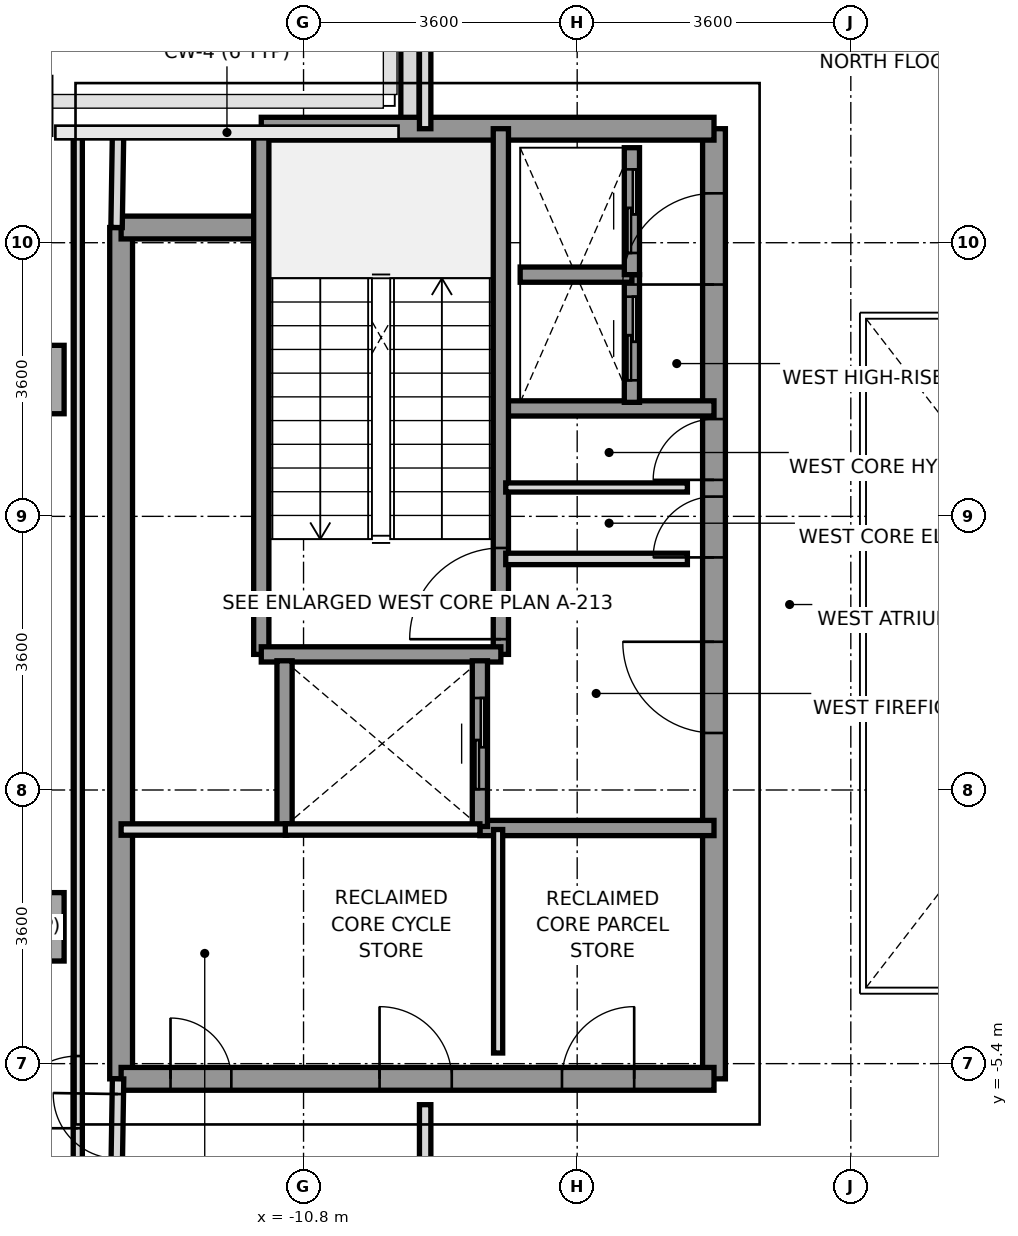
"""IFC4 building model, lengths in metres.
Left out: names, types, materials, properties, quantities, classifications, styles, units other than length and angle.
Written with IfcOpenShell. Run it as: python <this file> out.ifc"""

import sys

from ifc_helpers import new_model, si_unit, direction, frame, frame_2d, origin, origin_2d, place, context, subcontext, project, spatial, rectangle, extrude, source, transform, mapped, element, fill, save


model = new_model("IFC4")
c1 = context("Model", 3, precision=1e-05, world=origin(), true_north=direction((0.0, 1.0)))
c2 = subcontext(c1, "Body", "Model", "MODEL_VIEW")
j1 = project(units=[si_unit("LENGTHUNIT", "METRE"), si_unit("PLANEANGLEUNIT", "RADIAN")], contexts=[c1])
p1 = place(None, origin())
s1 = spatial("IfcSite", under=j1, at=p1, CompositionType="ELEMENT")
p2 = place(p1, origin())
s2 = spatial("IfcBuilding", under=s1, at=p2, CompositionType="ELEMENT")
p3 = place(p2, frame((0.0, 0.0, 219.4)))
s3 = spatial("IfcBuildingStorey", under=s2, at=p3, CompositionType="ELEMENT", Elevation=219.4)
m1 = source(origin(), c2, "Body", "SweptSolid", [
    extrude(rectangle(XDim=0.9, YDim=0.9, at=origin_2d()), origin(), (0.0, 0.0, 1.0), 4.01),
])
for number, where, z_axis, x_axis in (
    (1, (-14.4, -3.6, 0.0), (0.0, 0.0, 1.0), (1.0, 0.0, 0.0)),
    (2, (-14.4, 3.6, 0.0), (0.0, 0.0, 1.0), (1.0, 0.0, 0.0)),
):
    element("IfcColumn", number, at=place(p3, frame(where, z_axis=z_axis, x_axis=x_axis)), inside=s3, PredefinedType="COLUMN", context=c2, shape_type="MappedRepresentation", body=[
        mapped(m1, transform((0.0, 0.0, 0.0), x_axis=(1.0, 0.0, 0.0), y_axis=(0.0, 1.0, 0.0), z_axis=(0.0, 0.0, 1.0), scale=1.0)),
    ])
p4 = place(p3, frame((-9.4, 6.953, 0.0), z_axis=(0.0, 0.0, 1.0), x_axis=(0.0, 1.0, 0.0)))
e3 = element("IfcWall", 3, at=p4, inside=s3, PredefinedType="PARAPET", context=c2, shape_type="SweptSolid", body=[
    extrude(rectangle(XDim=1.669, YDim=0.24, at=frame_2d((0.834, 0.0))), origin(), (0.0, 0.0, 1.0), 1.15),
])
p5 = place(p3, frame((-13.2, -5.6, 0.0), z_axis=(0.0, 0.0, 1.0), x_axis=(0.0, 1.0, 0.0)))
e4 = element("IfcWall", 4, at=p5, inside=s3, PredefinedType="SHEAR", context=c2, shape_type="SweptSolid", body=[
    extrude(rectangle(XDim=11.2, YDim=0.3, at=frame_2d((5.6, 0.0))), origin(), (0.0, 0.0, 1.0), 4.01),
])
p6 = place(p3, frame((-5.4, -5.6, 0.0), z_axis=(0.0, 0.0, 1.0), x_axis=(0.0, 1.0, 0.0)))
e5 = element("IfcWall", 5, at=p6, inside=s3, PredefinedType="SHEAR", context=c2, shape_type="SweptSolid", body=[
    extrude(rectangle(XDim=12.5, YDim=0.3, at=frame_2d((6.25, 0.0))), origin(), (0.0, 0.0, 1.0), 4.01),
])
p7 = place(p6, frame((4.55, 0.0, 0.0)))
e6 = element("IfcOpeningElement", 6, at=p7, cuts=e5, PredefinedType="OPENING", context=c2, shape_type="SweptSolid", body=[
    extrude(rectangle(XDim=1.2, YDim=2.2, at=frame_2d((0.6, 1.1))), frame((0.0, 0.16, 0.0), z_axis=(0.0, -1.0, 0.0), x_axis=(1.0, 0.0, 0.0)), (0.0, 0.0, 1.0), 0.32),
])
p8 = place(p6, frame((10.45, 0.0, 0.0)))
e7 = element("IfcOpeningElement", 7, at=p8, cuts=e5, PredefinedType="OPENING", context=c2, shape_type="SweptSolid", body=[
    extrude(rectangle(XDim=1.2, YDim=2.2, at=frame_2d((0.6, 1.1))), frame((0.0, 0.16, 0.0), z_axis=(0.0, -1.0, 0.0), x_axis=(1.0, 0.0, 0.0)), (0.0, 0.0, 1.0), 0.32),
])
p9 = place(p6, frame((6.86, 0.0, 0.0)))
e8 = element("IfcOpeningElement", 8, at=p9, cuts=e5, PredefinedType="OPENING", context=c2, shape_type="SweptSolid", body=[
    extrude(rectangle(XDim=0.8, YDim=2.1, at=frame_2d((0.4, 1.05))), frame((0.0, 0.16, 0.0), z_axis=(0.0, -1.0, 0.0), x_axis=(1.0, 0.0, 0.0)), (0.0, 0.0, 1.0), 0.32),
])
p10 = place(p6, frame((7.88, 0.0, 0.0)))
e9 = element("IfcOpeningElement", 9, at=p10, cuts=e5, PredefinedType="OPENING", context=c2, shape_type="SweptSolid", body=[
    extrude(rectangle(XDim=0.8, YDim=2.1, at=frame_2d((0.4, 1.05))), frame((0.0, 0.16, 0.0), z_axis=(0.0, -1.0, 0.0), x_axis=(1.0, 0.0, 0.0)), (0.0, 0.0, 1.0), 0.32),
])
p11 = place(p3, frame((-11.356, 6.9, 0.0), z_axis=(0.0, 0.0, 1.0), x_axis=(1.0, 0.0, 0.0)))
e10 = element("IfcWall", 10, at=p11, inside=s3, PredefinedType="SHEAR", context=c2, shape_type="SweptSolid", body=[
    extrude(rectangle(XDim=5.956, YDim=0.3, at=frame_2d((2.978, 0.0))), origin(), (0.0, 0.0, 1.0), 4.01),
])
p12 = place(p3, frame((-13.2, 5.6, 0.0), z_axis=(0.0, 0.0, 1.0), x_axis=(1.0, 0.0, 0.0)))
e11 = element("IfcWall", 11, at=p12, inside=s3, PredefinedType="SHEAR", context=c2, shape_type="SweptSolid", body=[
    extrude(rectangle(XDim=1.844, YDim=0.3, at=frame_2d((0.922, 0.0))), origin(), (0.0, 0.0, 1.0), 4.01),
])
p13 = place(p3, frame((-13.2, -5.6, 0.0), z_axis=(0.0, 0.0, 1.0), x_axis=(1.0, 0.0, 0.0)))
e12 = element("IfcWall", 12, at=p13, inside=s3, PredefinedType="SHEAR", context=c2, shape_type="SweptSolid", body=[
    extrude(rectangle(XDim=7.8, YDim=0.3, at=frame_2d((3.9, 0.0))), origin(), (0.0, 0.0, 1.0), 4.01),
])
p14 = place(p13, frame((0.65, 0.0, 0.0)))
e13 = element("IfcOpeningElement", 13, at=p14, cuts=e12, PredefinedType="OPENING", context=c2, shape_type="SweptSolid", body=[
    extrude(rectangle(XDim=0.8, YDim=2.1, at=frame_2d((0.4, 1.05))), frame((0.0, 0.16, 0.0), z_axis=(0.0, -1.0, 0.0), x_axis=(1.0, 0.0, 0.0)), (0.0, 0.0, 1.0), 0.32),
])
p15 = place(p13, frame((3.4, 0.0, 0.0)))
e14 = element("IfcOpeningElement", 14, at=p15, cuts=e12, PredefinedType="OPENING", context=c2, shape_type="SweptSolid", body=[
    extrude(rectangle(XDim=0.95, YDim=2.15, at=frame_2d((0.475, 1.075))), frame((0.0, 0.16, 0.0), z_axis=(0.0, -1.0, 0.0), x_axis=(1.0, 0.0, 0.0)), (0.0, 0.0, 1.0), 0.32),
])
p16 = place(p13, frame((5.8, 0.0, 0.0)))
e15 = element("IfcOpeningElement", 15, at=p16, cuts=e12, PredefinedType="OPENING", context=c2, shape_type="SweptSolid", body=[
    extrude(rectangle(XDim=0.95, YDim=2.15, at=frame_2d((0.475, 1.075))), frame((0.0, 0.16, 0.0), z_axis=(0.0, -1.0, 0.0), x_axis=(1.0, 0.0, 0.0)), (0.0, 0.0, 1.0), 0.32),
])
p17 = place(p3, frame((-8.18, 3.22, 0.0), z_axis=(0.0, 0.0, 1.0), x_axis=(1.0, 0.0, 0.0)))
e16 = element("IfcWall", 16, at=p17, inside=s3, PredefinedType="SOLIDWALL", context=c2, shape_type="SweptSolid", body=[
    extrude(rectangle(XDim=2.78, YDim=0.2, at=frame_2d((1.39, 0.0))), origin(), (0.0, 0.0, 1.0), 4.01),
])
p18 = place(p3, frame((-8.48, -2.3, 0.0), z_axis=(0.0, 0.0, 1.0), x_axis=(1.0, 0.0, 0.0)))
e17 = element("IfcWall", 17, at=p18, inside=s3, PredefinedType="SOLIDWALL", context=c2, shape_type="SweptSolid", body=[
    extrude(rectangle(XDim=3.08, YDim=0.2, at=frame_2d((1.54, 0.0))), origin(), (0.0, 0.0, 1.0), 4.01),
])
p19 = place(p3, frame((-8.204, -0.016, 0.0), z_axis=(0.0, 0.0, 1.0), x_axis=(0.0, 1.0, 0.0)))
e18 = element("IfcWall", 18, at=p19, inside=s3, PredefinedType="SOLIDWALL", context=c2, shape_type="SweptSolid", body=[
    extrude(rectangle(XDim=6.916, YDim=0.2, at=frame_2d((3.458, 0.0))), origin(), (0.0, 0.0, 1.0), 4.01),
])
p20 = place(p19, frame((0.2, 0.0, 0.0)))
e19 = element("IfcOpeningElement", 19, at=p20, cuts=e18, PredefinedType="OPENING", context=c2, shape_type="SweptSolid", body=[
    extrude(rectangle(XDim=1.2, YDim=2.2, at=frame_2d((0.6, 1.1))), frame((0.0, 0.11, 0.0), z_axis=(0.0, -1.0, 0.0), x_axis=(1.0, 0.0, 0.0)), (0.0, 0.0, 1.0), 0.22),
])
p21 = place(p3, frame((-11.356, -0.016, 0.0), z_axis=(0.0, 0.0, 1.0), x_axis=(0.0, 1.0, 0.0)))
e20 = element("IfcWall", 20, at=p21, inside=s3, PredefinedType="SOLIDWALL", context=c2, shape_type="SweptSolid", body=[
    extrude(rectangle(XDim=6.916, YDim=0.2, at=frame_2d((3.458, 0.0))), origin(), (0.0, 0.0, 1.0), 4.01),
])
p22 = place(p3, frame((-11.356, -0.016, 0.0), z_axis=(0.0, 0.0, 1.0), x_axis=(1.0, 0.0, 0.0)))
e21 = element("IfcWall", 21, at=p22, inside=s3, PredefinedType="SOLIDWALL", context=c2, shape_type="SweptSolid", body=[
    extrude(rectangle(XDim=3.152, YDim=0.2, at=frame_2d((1.576, 0.0))), origin(), (0.0, 0.0, 1.0), 4.01),
])
p23 = place(p3, frame((-11.05, -2.28, 0.0), z_axis=(0.0, 0.0, 1.0), x_axis=(0.0, 1.0, 0.0)))
e22 = element("IfcWall", 22, at=p23, inside=s3, PredefinedType="SOLIDWALL", context=c2, shape_type="SweptSolid", body=[
    extrude(rectangle(XDim=2.18, YDim=0.2, at=frame_2d((1.09, 0.0))), origin(), (0.0, 0.0, 1.0), 4.01),
])
p24 = place(p3, frame((-8.48, -2.28, 0.0), z_axis=(0.0, 0.0, 1.0), x_axis=(0.0, 1.0, 0.0)))
e23 = element("IfcWall", 23, at=p24, inside=s3, PredefinedType="SOLIDWALL", context=c2, shape_type="SweptSolid", body=[
    extrude(rectangle(XDim=2.18, YDim=0.2, at=frame_2d((1.09, 0.0))), origin(), (0.0, 0.0, 1.0), 4.01),
])
p25 = place(p24, frame((0.49, 0.0, 0.0)))
e24 = element("IfcOpeningElement", 24, at=p25, cuts=e23, PredefinedType="OPENING", context=c2, shape_type="SweptSolid", body=[
    extrude(rectangle(XDim=1.2, YDim=2.2, at=frame_2d((0.6, 1.1))), frame((0.0, 0.11, 0.0), z_axis=(0.0, -1.0, 0.0), x_axis=(1.0, 0.0, 0.0)), (0.0, 0.0, 1.0), 0.22),
])
p26 = place(p3, frame((-6.48, 3.3, 0.0), z_axis=(0.0, 0.0, 1.0), x_axis=(0.0, 1.0, 0.0)))
e25 = element("IfcWall", 25, at=p26, inside=s3, PredefinedType="SOLIDWALL", context=c2, shape_type="SweptSolid", body=[
    extrude(rectangle(XDim=1.68, YDim=0.2, at=frame_2d((0.84, 0.0))), origin(), (0.0, 0.0, 1.0), 4.01),
])
p27 = place(p26, frame((0.29, 0.0, 0.0)))
e26 = element("IfcOpeningElement", 26, at=p27, cuts=e25, PredefinedType="OPENING", context=c2, shape_type="SweptSolid", body=[
    extrude(rectangle(XDim=1.1, YDim=2.2, at=frame_2d((0.55, 1.1))), frame((0.0, 0.11, 0.0), z_axis=(0.0, -1.0, 0.0), x_axis=(1.0, 0.0, 0.0)), (0.0, 0.0, 1.0), 0.22),
])
p28 = place(p3, frame((-7.95, 4.98, 0.0), z_axis=(0.0, 0.0, 1.0), x_axis=(1.0, 0.0, 0.0)))
e27 = element("IfcWall", 27, at=p28, inside=s3, PredefinedType="SOLIDWALL", context=c2, shape_type="SweptSolid", body=[
    extrude(rectangle(XDim=1.47, YDim=0.2, at=frame_2d((0.735, 0.0))), origin(), (0.0, 0.0, 1.0), 4.01),
])
p29 = place(p3, frame((-6.48, 4.98, 0.0), z_axis=(0.0, 0.0, 1.0), x_axis=(0.0, 1.0, 0.0)))
e28 = element("IfcWall", 28, at=p29, inside=s3, PredefinedType="SOLIDWALL", context=c2, shape_type="SweptSolid", body=[
    extrude(rectangle(XDim=1.67, YDim=0.2, at=frame_2d((0.835, 0.0))), origin(), (0.0, 0.0, 1.0), 4.01),
])
p30 = place(p29, frame((0.285, 0.0, 0.0)))
e29 = element("IfcOpeningElement", 29, at=p30, cuts=e28, PredefinedType="OPENING", context=c2, shape_type="SweptSolid", body=[
    extrude(rectangle(XDim=1.1, YDim=2.2, at=frame_2d((0.55, 1.1))), frame((0.0, 0.11, 0.0), z_axis=(0.0, -1.0, 0.0), x_axis=(1.0, 0.0, 0.0)), (0.0, 0.0, 1.0), 0.22),
])
p31 = place(p3, frame((-8.14, 1.24, 0.0), z_axis=(0.0, 0.0, 1.0), x_axis=(1.0, 0.0, 0.0)))
e30 = element("IfcWall", 30, at=p31, inside=s3, PredefinedType="PARTITIONING", context=c2, shape_type="SweptSolid", body=[
    extrude(rectangle(XDim=2.39, YDim=0.15, at=frame_2d((1.195, 0.0))), origin(), (0.0, 0.0, 1.0), 3.11),
])
p32 = place(p3, frame((-8.14, 2.18, 0.0), z_axis=(0.0, 0.0, 1.0), x_axis=(1.0, 0.0, 0.0)))
e31 = element("IfcWall", 31, at=p32, inside=s3, PredefinedType="PARTITIONING", context=c2, shape_type="SweptSolid", body=[
    extrude(rectangle(XDim=2.39, YDim=0.12, at=frame_2d((1.195, 0.0))), origin(), (0.0, 0.0, 1.0), 3.11),
])
p33 = place(p3, frame((-13.2, -2.32, 0.0), z_axis=(0.0, 0.0, 1.0), x_axis=(1.0, 0.0, 0.0)))
e32 = element("IfcWall", 32, at=p33, inside=s3, PredefinedType="PARTITIONING", context=c2, shape_type="SweptSolid", body=[
    extrude(rectangle(XDim=2.18, YDim=0.15, at=frame_2d((1.09, 0.0))), origin(), (0.0, 0.0, 1.0), 4.01),
])
p34 = place(p3, frame((-8.24, -5.26, 0.0), z_axis=(0.0, 0.0, 1.0), x_axis=(0.0, 1.0, 0.0)))
e33 = element("IfcWall", 33, at=p34, inside=s3, PredefinedType="PARTITIONING", context=c2, shape_type="SweptSolid", body=[
    extrude(rectangle(XDim=2.94, YDim=0.12, at=frame_2d((1.47, 0.0))), origin(), (0.0, 0.0, 1.0), 4.01),
])
p35 = place(p3, frame((-11.04, -2.32, 0.0), z_axis=(0.0, 0.0, 1.0), x_axis=(1.0, 0.0, 0.0)))
e34 = element("IfcWall", 34, at=p35, inside=s3, PredefinedType="PARTITIONING", context=c2, shape_type="SweptSolid", body=[
    extrude(rectangle(XDim=2.56, YDim=0.15, at=frame_2d((1.28, 0.0))), origin(), (0.0, 0.0, 1.0), 4.01),
])
p36 = place(p3, frame((-9.2, 6.9, 0.0), z_axis=(0.0, 0.0, 1.0), x_axis=(0.0, 1.0, 0.0)))
e35 = element("IfcWall", 35, at=p36, inside=s3, PredefinedType="PARTITIONING", context=c2, shape_type="SweptSolid", body=[
    extrude(rectangle(XDim=3.38, YDim=0.15, at=frame_2d((1.69, 0.0))), origin(), (0.0, 0.0, 1.0), 3.61),
])
p37 = place(p3, frame((-9.2, -10.28, 0.0), z_axis=(0.0, 0.0, 1.0), x_axis=(0.0, 1.0, 0.0)))
e36 = element("IfcWall", 36, at=p37, inside=s3, PredefinedType="PARTITIONING", context=c2, shape_type="SweptSolid", body=[
    extrude(rectangle(XDim=4.34, YDim=0.15, at=frame_2d((2.17, 0.0))), origin(), (0.0, 0.0, 1.0), 3.61),
])
p38 = place(p3, frame((-13.26, 5.6, 0.0), z_axis=(0.0, 0.0, 1.0), x_axis=(0.016013571389, 0.999871774545, 0.0)))
e37 = element("IfcWall", 37, at=p38, inside=s3, PredefinedType="PARTITIONING", context=c2, shape_type="SweptSolid", body=[
    extrude(rectangle(XDim=1.25, YDim=0.15, at=frame_2d((0.625, 0.0))), origin(), (0.0, 0.0, 1.0), 4.01),
])
p39 = place(p3, frame((-13.26, -6.85, 0.0), z_axis=(0.0, 0.0, 1.0), x_axis=(0.016013571389, 0.999871774545, 0.0)))
e38 = element("IfcWall", 38, at=p39, inside=s3, PredefinedType="PARTITIONING", context=c2, shape_type="SweptSolid", body=[
    extrude(rectangle(XDim=1.25, YDim=0.15, at=frame_2d((0.625, 0.0))), origin(), (0.0, 0.0, 1.0), 4.01),
])
p40 = place(p39, frame((0.2, 0.0, 0.0)))
e39 = element("IfcOpeningElement", 39, at=p40, cuts=e38, PredefinedType="OPENING", context=c2, shape_type="SweptSolid", body=[
    extrude(rectangle(XDim=0.85, YDim=2.1, at=frame_2d((0.425, 1.05))), frame((0.0, 0.085, 0.0), z_axis=(0.0, -1.0, 0.0), x_axis=(1.0, 0.0, 0.0)), (0.0, 0.0, 1.0), 0.17),
])
p41 = place(p3, frame((-13.77, -6.85, 0.0), z_axis=(0.0, 0.0, 1.0), x_axis=(0.0, 1.0, 0.0)))
e40 = element("IfcWall", 40, at=p41, inside=s3, PredefinedType="PARTITIONING", context=c2, shape_type="SweptSolid", body=[
    extrude(rectangle(XDim=13.7, YDim=0.12, at=frame_2d((6.85, 0.0))), origin(), (0.0, 0.0, 1.0), 3.71),
])
p42 = place(p41, frame((0.6, 0.0, 0.0)))
e41 = element("IfcOpeningElement", 41, at=p42, cuts=e40, PredefinedType="OPENING", context=c2, shape_type="SweptSolid", body=[
    extrude(rectangle(XDim=0.95, YDim=2.15, at=frame_2d((0.475, 1.075))), frame((0.0, 0.07, 0.0), z_axis=(0.0, -1.0, 0.0), x_axis=(1.0, 0.0, 0.0)), (0.0, 0.0, 1.0), 0.14),
])
m2 = source(origin(), c2, "Body", "SweptSolid", [
    extrude(rectangle(XDim=1.2, YDim=2.2, at=frame_2d((0.6, 1.1))), frame((0.0, 0.025, 0.0), z_axis=(0.0, -1.0, 0.0), x_axis=(1.0, 0.0, 0.0)), (0.0, 0.0, 1.0), 0.05),
])
p43 = place(p20, origin())
e42 = element("IfcDoor", 42, at=p43, inside=s3, OperationType="SINGLE_SWING_LEFT", PredefinedType="DOOR", context=c2, shape_type="MappedRepresentation", body=[
    mapped(m2, transform((0.0, 0.0, 0.0), x_axis=(1.0, 0.0, 0.0), y_axis=(0.0, 1.0, 0.0), z_axis=(0.0, 0.0, 1.0), scale=1.0)),
])
fill(e19, e42)
p44 = place(p7, origin())
e43 = element("IfcDoor", 43, at=p44, inside=s3, OperationType="SINGLE_SWING_RIGHT", PredefinedType="DOOR", context=c2, shape_type="MappedRepresentation", body=[
    mapped(m2, transform((0.0, 0.0, 0.0), x_axis=(1.0, 0.0, 0.0), y_axis=(0.0, 1.0, 0.0), z_axis=(0.0, 0.0, 1.0), scale=1.0)),
])
fill(e6, e43)
p45 = place(p8, origin())
e44 = element("IfcDoor", 44, at=p45, inside=s3, OperationType="SINGLE_SWING_LEFT", PredefinedType="DOOR", context=c2, shape_type="MappedRepresentation", body=[
    mapped(m2, transform((0.0, 0.0, 0.0), x_axis=(1.0, 0.0, 0.0), y_axis=(0.0, 1.0, 0.0), z_axis=(0.0, 0.0, 1.0), scale=1.0)),
])
fill(e7, e44)
m3 = source(origin(), c2, "Body", "SweptSolid", [
    extrude(rectangle(XDim=0.8, YDim=2.1, at=frame_2d((0.4, 1.05))), frame((0.0, 0.025, 0.0), z_axis=(0.0, -1.0, 0.0), x_axis=(1.0, 0.0, 0.0)), (0.0, 0.0, 1.0), 0.05),
])
p46 = place(p9, origin())
e45 = element("IfcDoor", 45, at=p46, inside=s3, OperationType="SINGLE_SWING_LEFT", PredefinedType="DOOR", context=c2, shape_type="MappedRepresentation", body=[
    mapped(m3, transform((0.0, 0.0, 0.0), x_axis=(1.0, 0.0, 0.0), y_axis=(0.0, 1.0, 0.0), z_axis=(0.0, 0.0, 1.0), scale=1.0)),
])
fill(e8, e45)
p47 = place(p10, origin())
e46 = element("IfcDoor", 46, at=p47, inside=s3, OperationType="SINGLE_SWING_LEFT", PredefinedType="DOOR", context=c2, shape_type="MappedRepresentation", body=[
    mapped(m3, transform((0.0, 0.0, 0.0), x_axis=(1.0, 0.0, 0.0), y_axis=(0.0, 1.0, 0.0), z_axis=(0.0, 0.0, 1.0), scale=1.0)),
])
fill(e9, e46)
p48 = place(p14, origin())
e47 = element("IfcDoor", 47, at=p48, inside=s3, OperationType="SINGLE_SWING_LEFT", PredefinedType="DOOR", context=c2, shape_type="MappedRepresentation", body=[
    mapped(m3, transform((0.0, 0.0, 0.0), x_axis=(1.0, 0.0, 0.0), y_axis=(0.0, 1.0, 0.0), z_axis=(0.0, 0.0, 1.0), scale=1.0)),
])
fill(e13, e47)
m4 = source(origin(), c2, "Body", "SweptSolid", [
    extrude(rectangle(XDim=0.95, YDim=2.15, at=frame_2d((0.475, 1.075))), frame((0.0, 0.025, 0.0), z_axis=(0.0, -1.0, 0.0), x_axis=(1.0, 0.0, 0.0)), (0.0, 0.0, 1.0), 0.05),
])
p49 = place(p15, origin())
e48 = element("IfcDoor", 48, at=p49, inside=s3, OperationType="SINGLE_SWING_LEFT", PredefinedType="DOOR", context=c2, shape_type="MappedRepresentation", body=[
    mapped(m4, transform((0.0, 0.0, 0.0), x_axis=(1.0, 0.0, 0.0), y_axis=(0.0, 1.0, 0.0), z_axis=(0.0, 0.0, 1.0), scale=1.0)),
])
fill(e14, e48)
p50 = place(p16, origin())
e49 = element("IfcDoor", 49, at=p50, inside=s3, OperationType="SINGLE_SWING_RIGHT", PredefinedType="DOOR", context=c2, shape_type="MappedRepresentation", body=[
    mapped(m4, transform((0.0, 0.0, 0.0), x_axis=(1.0, 0.0, 0.0), y_axis=(0.0, 1.0, 0.0), z_axis=(0.0, 0.0, 1.0), scale=1.0)),
])
fill(e15, e49)
p51 = place(p25, origin())
e50 = element("IfcDoor", 50, at=p51, inside=s3, OperationType="SLIDING_TO_RIGHT", PredefinedType="DOOR", context=c2, shape_type="MappedRepresentation", body=[
    mapped(m2, transform((0.0, 0.0, 0.0), x_axis=(1.0, 0.0, 0.0), y_axis=(0.0, 1.0, 0.0), z_axis=(0.0, 0.0, 1.0), scale=1.0)),
])
fill(e24, e50)
m5 = source(origin(), c2, "Body", "SweptSolid", [
    extrude(rectangle(XDim=1.1, YDim=2.2, at=frame_2d((0.55, 1.1))), frame((0.0, 0.025, 0.0), z_axis=(0.0, -1.0, 0.0), x_axis=(1.0, 0.0, 0.0)), (0.0, 0.0, 1.0), 0.05),
])
p52 = place(p27, origin())
e51 = element("IfcDoor", 51, at=p52, inside=s3, OperationType="SLIDING_TO_LEFT", PredefinedType="DOOR", context=c2, shape_type="MappedRepresentation", body=[
    mapped(m5, transform((0.0, 0.0, 0.0), x_axis=(1.0, 0.0, 0.0), y_axis=(0.0, 1.0, 0.0), z_axis=(0.0, 0.0, 1.0), scale=1.0)),
])
fill(e26, e51)
p53 = place(p30, origin())
e52 = element("IfcDoor", 52, at=p53, inside=s3, OperationType="SLIDING_TO_LEFT", PredefinedType="DOOR", context=c2, shape_type="MappedRepresentation", body=[
    mapped(m5, transform((0.0, 0.0, 0.0), x_axis=(1.0, 0.0, 0.0), y_axis=(0.0, 1.0, 0.0), z_axis=(0.0, 0.0, 1.0), scale=1.0)),
])
fill(e29, e52)
p54 = place(p42, origin())
e53 = element("IfcDoor", 53, at=p54, inside=s3, OperationType="SINGLE_SWING_LEFT", PredefinedType="DOOR", context=c2, shape_type="MappedRepresentation", body=[
    mapped(m4, transform((0.0, 0.0, 0.0), x_axis=(1.0, 0.0, 0.0), y_axis=(0.0, 1.0, 0.0), z_axis=(0.0, 0.0, 1.0), scale=1.0)),
])
fill(e41, e53)
m6 = source(origin(), c2, "Body", "SweptSolid", [
    extrude(rectangle(XDim=0.85, YDim=2.1, at=frame_2d((0.425, 1.05))), frame((0.0, 0.025, 0.0), z_axis=(0.0, -1.0, 0.0), x_axis=(1.0, 0.0, 0.0)), (0.0, 0.0, 1.0), 0.05),
])
p55 = place(p40, origin())
e54 = element("IfcDoor", 54, at=p55, inside=s3, OperationType="SINGLE_SWING_RIGHT", PredefinedType="DOOR", context=c2, shape_type="MappedRepresentation", body=[
    mapped(m6, transform((0.0, 0.0, 0.0), x_axis=(1.0, 0.0, 0.0), y_axis=(0.0, 1.0, 0.0), z_axis=(0.0, 0.0, 1.0), scale=1.0)),
])
fill(e39, e54)
save(model, sys.argv[1])
